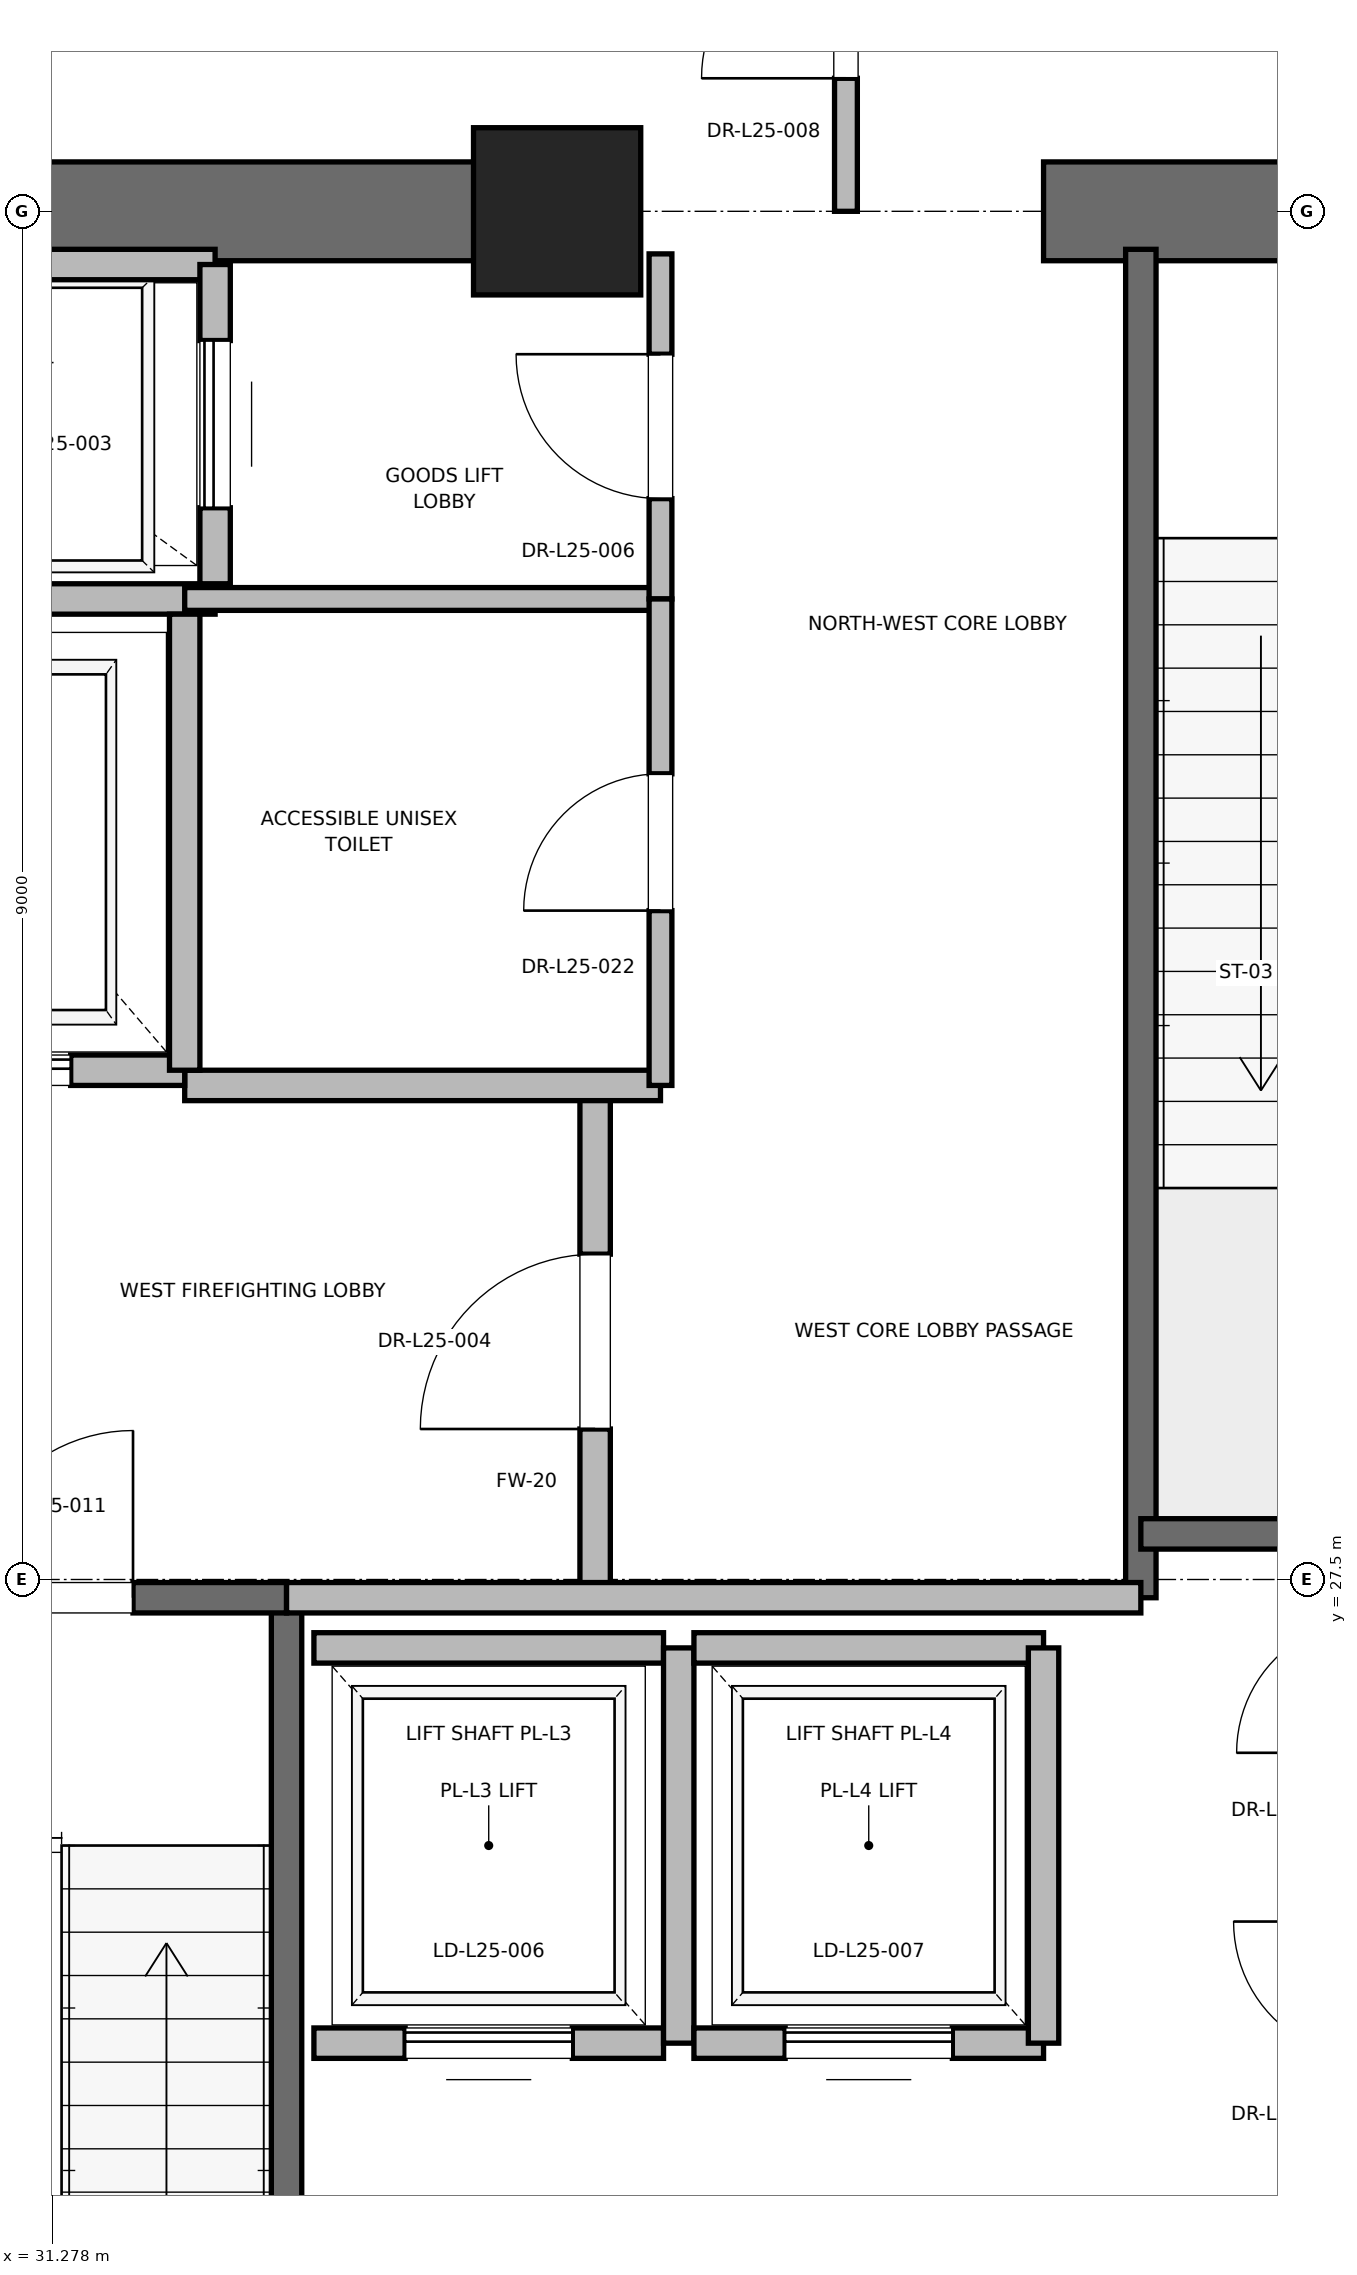
"""IFC4 building model, lengths in metres.
Left out: names, types, materials, properties, quantities, classifications, styles, units other than length and angle.
Written with IfcOpenShell. Run it as: python <this file> out.ifc"""

import sys

from ifc_helpers import new_model, si_unit, direction, frame, frame_2d, origin, origin_2d, place, context, subcontext, project, spatial, rectangle, extrude, element, fill, save


model = new_model("IFC4")
c1 = context("Model", 3, precision=1e-05, world=origin(), true_north=direction((0.0, 1.0)))
c2 = subcontext(c1, "Body", "Model", "MODEL_VIEW")
j1 = project(units=[si_unit("LENGTHUNIT", "METRE"), si_unit("PLANEANGLEUNIT", "RADIAN")], contexts=[c1])
p1 = place(None, origin())
s1 = spatial("IfcSite", under=j1, at=p1, CompositionType="ELEMENT")
p2 = place(p1, origin())
s2 = spatial("IfcBuilding", under=s1, at=p2, CompositionType="ELEMENT")
p3 = place(p2, frame((0.0, 0.0, 107.6)))
s3 = spatial("IfcBuildingStorey", under=s2, at=p3, CompositionType="ELEMENT", Elevation=107.6)
p4 = place(p3, frame((34.6, 36.5, 0.0), z_axis=(0.0, 0.0, 1.0), x_axis=(1.0, 0.0, 0.0)))
e1 = element("IfcColumn", 1, at=p4, inside=s3, PredefinedType="PILASTER", context=c2, shape_type="SweptSolid", body=[
    extrude(rectangle(XDim=1.1, YDim=1.1, at=origin_2d()), origin(), (0.0, 0.0, 1.0), 5.4),
])
p5 = place(p3, frame((29.0, 36.5, 0.0), z_axis=(0.0, 0.0, 1.0), x_axis=(1.0, 0.0, 0.0)))
e2 = element("IfcWall", 2, at=p5, inside=s3, PredefinedType="SHEAR", context=c2, shape_type="SweptSolid", body=[
    extrude(rectangle(XDim=5.8, YDim=0.65, at=frame_2d((2.9, 0.0))), origin(), (0.0, 0.0, 1.0), 5.1),
])
p6 = place(p3, frame((37.8, 36.5, 0.0), z_axis=(0.0, 0.0, 1.0), x_axis=(1.0, 0.0, 0.0)))
e3 = element("IfcWall", 3, at=p6, inside=s3, PredefinedType="SHEAR", context=c2, shape_type="SweptSolid", body=[
    extrude(rectangle(XDim=4.4, YDim=0.65, at=frame_2d((2.2, 0.0))), origin(), (0.0, 0.0, 1.0), 5.1),
])
p7 = place(p6, frame((1.65, 0.0, 0.0)))
e4 = element("IfcOpeningElement", 4, at=p7, cuts=e3, PredefinedType="OPENING", context=c2, shape_type="SweptSolid", body=[
    extrude(rectangle(XDim=1.1, YDim=2.15, at=frame_2d((0.55, 1.075))), frame((0.0, 0.325, 0.0), z_axis=(0.0, -1.0, 0.0), x_axis=(1.0, 0.0, 0.0)), (0.0, 0.0, 1.0), 0.65),
])
p8 = place(p3, frame((32.82, 18.6, 0.0), z_axis=(0.0, 0.0, 1.0), x_axis=(0.0, 1.0, 0.0)))
e5 = element("IfcWall", 5, at=p8, inside=s3, PredefinedType="SOLIDWALL", context=c2, shape_type="SweptSolid", body=[
    extrude(rectangle(XDim=8.78, YDim=0.2, at=frame_2d((4.39, 0.0))), origin(), (0.0, 0.0, 1.0), 5.1),
])
p9 = place(p3, frame((29.7, 27.38, 0.0), z_axis=(0.0, 0.0, 1.0), x_axis=(1.0, 0.0, 0.0)))
e6 = element("IfcWall", 6, at=p9, inside=s3, PredefinedType="SOLIDWALL", context=c2, shape_type="SweptSolid", body=[
    extrude(rectangle(XDim=3.12, YDim=0.2, at=frame_2d((1.56, 0.0))), origin(), (0.0, 0.0, 1.0), 5.1),
])
p10 = place(p9, frame((1.01, 0.0, 0.0)))
e7 = element("IfcOpeningElement", 7, at=p10, cuts=e6, PredefinedType="OPENING", context=c2, shape_type="SweptSolid", body=[
    extrude(rectangle(XDim=1.1, YDim=2.15, at=frame_2d((0.55, 1.075))), frame((0.0, 0.1, 0.0), z_axis=(0.0, -1.0, 0.0), x_axis=(1.0, 0.0, 0.0)), (0.0, 0.0, 1.0), 0.2),
])
p11 = place(p3, frame((38.44, 27.38, 0.0), z_axis=(0.0, 0.0, 1.0), x_axis=(0.0, 1.0, 0.0)))
e8 = element("IfcWall", 8, at=p11, inside=s3, PredefinedType="SOLIDWALL", context=c2, shape_type="SweptSolid", body=[
    extrude(rectangle(XDim=8.87, YDim=0.2, at=frame_2d((4.435, 0.0))), origin(), (0.0, 0.0, 1.0), 5.1),
])
p12 = place(p3, frame((38.44, 27.8, 0.0), z_axis=(0.0, 0.0, 1.0), x_axis=(1.0, 0.0, 0.0)))
e9 = element("IfcWall", 9, at=p12, inside=s3, PredefinedType="SOLIDWALL", context=c2, shape_type="SweptSolid", body=[
    extrude(rectangle(XDim=3.32, YDim=0.2, at=frame_2d((1.66, 0.0))), origin(), (0.0, 0.0, 1.0), 5.1),
])
p13 = place(p3, frame((34.85, 27.38, 0.0), z_axis=(0.0, 0.0, 1.0), x_axis=(0.0, 1.0, 0.0)))
e10 = element("IfcWall", 10, at=p13, inside=s3, PredefinedType="PARTITIONING", context=c2, shape_type="SweptSolid", body=[
    extrude(rectangle(XDim=3.37, YDim=0.2, at=frame_2d((1.685, 0.0))), origin(), (0.0, 0.0, 1.0), 5.1),
])
p14 = place(p13, frame((1.11, 0.0, 0.0)))
e11 = element("IfcOpeningElement", 11, at=p14, cuts=e10, PredefinedType="OPENING", context=c2, shape_type="SweptSolid", body=[
    extrude(rectangle(XDim=1.15, YDim=2.2, at=frame_2d((0.575, 1.1))), frame((0.0, 0.1, 0.0), z_axis=(0.0, -1.0, 0.0), x_axis=(1.0, 0.0, 0.0)), (0.0, 0.0, 1.0), 0.2),
])
p15 = place(p3, frame((32.82, 27.38, 0.0), z_axis=(0.0, 0.0, 1.0), x_axis=(1.0, 0.0, 0.0)))
e12 = element("IfcWall", 12, at=p15, inside=s3, PredefinedType="PARTITIONING", context=c2, shape_type="SweptSolid", body=[
    extrude(rectangle(XDim=5.62, YDim=0.2, at=frame_2d((2.81, 0.0))), origin(), (0.0, 0.0, 1.0), 5.1),
])
p16 = place(p3, frame((32.15, 30.75, 0.0), z_axis=(0.0, 0.0, 1.0), x_axis=(1.0, 0.0, 0.0)))
e13 = element("IfcWall", 13, at=p16, inside=s3, PredefinedType="PARTITIONING", context=c2, shape_type="SweptSolid", body=[
    extrude(rectangle(XDim=3.13, YDim=0.2, at=frame_2d((1.565, 0.0))), origin(), (0.0, 0.0, 1.0), 5.1),
])
p17 = place(p3, frame((29.55, 30.85, 0.0), z_axis=(0.0, 0.0, 1.0), x_axis=(1.0, 0.0, 0.0)))
e14 = element("IfcWall", 14, at=p17, inside=s3, PredefinedType="SOLIDWALL", context=c2, shape_type="SweptSolid", body=[
    extrude(rectangle(XDim=2.6, YDim=0.2, at=frame_2d((1.3, 0.0))), origin(), (0.0, 0.0, 1.0), 3.88),
])
p18 = place(p17, frame((0.75, 0.0, 0.0)))
e15 = element("IfcOpeningElement", 15, at=p18, cuts=e14, PredefinedType="OPENING", context=c2, shape_type="SweptSolid", body=[
    extrude(rectangle(XDim=1.1, YDim=2.2, at=frame_2d((0.55, 1.1))), frame((0.0, 0.1, 0.0), z_axis=(0.0, -1.0, 0.0), x_axis=(1.0, 0.0, 0.0)), (0.0, 0.0, 1.0), 0.2),
])
p19 = place(p3, frame((29.55, 33.95, 0.0), z_axis=(0.0, 0.0, 1.0), x_axis=(1.0, 0.0, 0.0)))
e16 = element("IfcWall", 16, at=p19, inside=s3, PredefinedType="SOLIDWALL", context=c2, shape_type="SweptSolid", body=[
    extrude(rectangle(XDim=2.8, YDim=0.2, at=frame_2d((1.4, 0.0))), origin(), (0.0, 0.0, 1.0), 5.1),
])
p20 = place(p3, frame((32.15, 30.85, 0.0), z_axis=(0.0, 0.0, 1.0), x_axis=(0.0, 1.0, 0.0)))
e17 = element("IfcWall", 17, at=p20, inside=s3, PredefinedType="SOLIDWALL", context=c2, shape_type="SweptSolid", body=[
    extrude(rectangle(XDim=3.0, YDim=0.2, at=frame_2d((1.5, 0.0))), origin(), (0.0, 0.0, 1.0), 5.1),
])
p21 = place(p3, frame((32.35, 36.15, 0.0), z_axis=(0.0, 0.0, 1.0), x_axis=(-1.0, 0.0, 0.0)))
e18 = element("IfcWall", 18, at=p21, inside=s3, PredefinedType="SOLIDWALL", context=c2, shape_type="SweptSolid", body=[
    extrude(rectangle(XDim=2.8, YDim=0.2, at=frame_2d((1.4, 0.0))), origin(), (0.0, 0.0, 1.0), 4.153),
])
p22 = place(p3, frame((32.35, 34.05, 0.0), z_axis=(0.0, 0.0, 1.0), x_axis=(0.0, 1.0, 0.0)))
e19 = element("IfcWall", 19, at=p22, inside=s3, PredefinedType="SOLIDWALL", context=c2, shape_type="SweptSolid", body=[
    extrude(rectangle(XDim=2.1, YDim=0.2, at=frame_2d((1.05, 0.0))), origin(), (0.0, 0.0, 1.0), 5.1),
])
p23 = place(p22, frame((0.5, 0.0, 0.0)))
e20 = element("IfcOpeningElement", 20, at=p23, cuts=e19, PredefinedType="OPENING", context=c2, shape_type="SweptSolid", body=[
    extrude(rectangle(XDim=1.1, YDim=2.2, at=frame_2d((0.55, 1.1))), frame((0.0, 0.1, 0.0), z_axis=(0.0, -1.0, 0.0), x_axis=(1.0, 0.0, 0.0)), (0.0, 0.0, 1.0), 0.2),
])
p24 = place(p3, frame((33.0, 24.45, 0.0), z_axis=(0.0, 0.0, 1.0), x_axis=(1.0, 0.0, 0.0)))
e21 = element("IfcWall", 21, at=p24, inside=s3, PredefinedType="SOLIDWALL", context=c2, shape_type="SweptSolid", body=[
    extrude(rectangle(XDim=2.3, YDim=0.2, at=frame_2d((1.15, 0.0))), origin(), (0.0, 0.0, 1.0), 5.1),
])
p25 = place(p24, frame((0.6, 0.0, 0.0)))
e22 = element("IfcOpeningElement", 22, at=p25, cuts=e21, PredefinedType="OPENING", context=c2, shape_type="SweptSolid", body=[
    extrude(rectangle(XDim=1.1, YDim=2.2, at=frame_2d((0.55, 1.1))), frame((0.0, 0.1, 0.0), z_axis=(0.0, -1.0, 0.0), x_axis=(1.0, 0.0, 0.0)), (0.0, 0.0, 1.0), 0.2),
])
p26 = place(p3, frame((35.3, 27.05, 0.0), z_axis=(0.0, 0.0, 1.0), x_axis=(-1.0, 0.0, 0.0)))
e23 = element("IfcWall", 23, at=p26, inside=s3, PredefinedType="SOLIDWALL", context=c2, shape_type="SweptSolid", body=[
    extrude(rectangle(XDim=2.3, YDim=0.2, at=frame_2d((1.15, 0.0))), origin(), (0.0, 0.0, 1.0), 5.1),
])
p27 = place(p3, frame((35.4, 24.45, 0.0), z_axis=(0.0, 0.0, 1.0), x_axis=(0.0, 1.0, 0.0)))
e24 = element("IfcWall", 24, at=p27, inside=s3, PredefinedType="SOLIDWALL", context=c2, shape_type="SweptSolid", body=[
    extrude(rectangle(XDim=2.6, YDim=0.2, at=frame_2d((1.3, 0.0))), origin(), (0.0, 0.0, 1.0), 5.1),
])
p28 = place(p3, frame((35.5, 24.45, 0.0), z_axis=(0.0, 0.0, 1.0), x_axis=(1.0, 0.0, 0.0)))
e25 = element("IfcWall", 25, at=p28, inside=s3, PredefinedType="SOLIDWALL", context=c2, shape_type="SweptSolid", body=[
    extrude(rectangle(XDim=2.3, YDim=0.2, at=frame_2d((1.15, 0.0))), origin(), (0.0, 0.0, 1.0), 5.1),
])
p29 = place(p28, frame((0.6, 0.0, 0.0)))
e26 = element("IfcOpeningElement", 26, at=p29, cuts=e25, PredefinedType="OPENING", context=c2, shape_type="SweptSolid", body=[
    extrude(rectangle(XDim=1.1, YDim=2.2, at=frame_2d((0.55, 1.1))), frame((0.0, 0.1, 0.0), z_axis=(0.0, -1.0, 0.0), x_axis=(1.0, 0.0, 0.0)), (0.0, 0.0, 1.0), 0.2),
])
p30 = place(p3, frame((37.8, 27.05, 0.0), z_axis=(0.0, 0.0, 1.0), x_axis=(-1.0, 0.0, 0.0)))
e27 = element("IfcWall", 27, at=p30, inside=s3, PredefinedType="SOLIDWALL", context=c2, shape_type="SweptSolid", body=[
    extrude(rectangle(XDim=2.3, YDim=0.2, at=frame_2d((1.15, 0.0))), origin(), (0.0, 0.0, 1.0), 5.1),
])
p31 = place(p3, frame((37.8, 24.45, 0.0), z_axis=(0.0, 0.0, 1.0), x_axis=(0.0, 1.0, 0.0)))
e28 = element("IfcWall", 28, at=p31, inside=s3, PredefinedType="SOLIDWALL", context=c2, shape_type="SweptSolid", body=[
    extrude(rectangle(XDim=2.6, YDim=0.2, at=frame_2d((1.3, 0.0))), origin(), (0.0, 0.0, 1.0), 5.1),
])
p32 = place(p3, frame((32.15, 33.95, 0.0), z_axis=(0.0, 0.0, 1.0), x_axis=(1.0, 0.0, 0.0)))
e29 = element("IfcWall", 29, at=p32, inside=s3, PredefinedType="PARTITIONING", context=c2, shape_type="SweptSolid", body=[
    extrude(rectangle(XDim=3.13, YDim=0.15, at=frame_2d((1.565, 0.0))), origin(), (0.0, 0.0, 1.0), 2.85),
])
p33 = place(p3, frame((35.28, 33.95, 0.0), z_axis=(0.0, 0.0, 1.0), x_axis=(0.0, 1.0, 0.0)))
e30 = element("IfcWall", 30, at=p33, inside=s3, PredefinedType="PARTITIONING", context=c2, shape_type="SweptSolid", body=[
    extrude(rectangle(XDim=2.27, YDim=0.15, at=frame_2d((1.135, 0.0))), origin(), (0.0, 0.0, 1.0), 2.85),
])
p34 = place(p33, frame((0.66, 0.0, 0.0)))
e31 = element("IfcOpeningElement", 31, at=p34, cuts=e30, PredefinedType="OPENING", context=c2, shape_type="SweptSolid", body=[
    extrude(rectangle(XDim=0.95, YDim=2.15, at=frame_2d((0.475, 1.075))), frame((0.0, 0.075, 0.0), z_axis=(0.0, -1.0, 0.0), x_axis=(1.0, 0.0, 0.0)), (0.0, 0.0, 1.0), 0.15),
])
p35 = place(p3, frame((35.28, 30.75, 0.0), z_axis=(0.0, 0.0, 1.0), x_axis=(0.0, 1.0, 0.0)))
e32 = element("IfcWall", 32, at=p35, inside=s3, PredefinedType="PARTITIONING", context=c2, shape_type="SweptSolid", body=[
    extrude(rectangle(XDim=3.2, YDim=0.15, at=frame_2d((1.6, 0.0))), origin(), (0.0, 0.0, 1.0), 2.85),
])
p36 = place(p35, frame((1.15, 0.0, 0.0)))
e33 = element("IfcOpeningElement", 33, at=p36, cuts=e32, PredefinedType="OPENING", context=c2, shape_type="SweptSolid", body=[
    extrude(rectangle(XDim=0.9, YDim=2.1, at=frame_2d((0.45, 1.05))), frame((0.0, 0.075, 0.0), z_axis=(0.0, -1.0, 0.0), x_axis=(1.0, 0.0, 0.0)), (0.0, 0.0, 1.0), 0.15),
])
p37 = place(p3, frame((36.5, 36.5, 0.0), z_axis=(0.0, 0.0, 1.0), x_axis=(0.0, 1.0, 0.0)))
e34 = element("IfcWall", 34, at=p37, inside=s3, PredefinedType="PARTITIONING", context=c2, shape_type="SweptSolid", body=[
    extrude(rectangle(XDim=2.7, YDim=0.15, at=frame_2d((1.35, 0.0))), origin(), (0.0, 0.0, 1.0), 2.85),
])
p38 = place(p37, frame((0.875, 0.0, 0.0)))
e35 = element("IfcOpeningElement", 35, at=p38, cuts=e34, PredefinedType="OPENING", context=c2, shape_type="SweptSolid", body=[
    extrude(rectangle(XDim=0.95, YDim=2.15, at=frame_2d((0.475, 1.075))), frame((0.0, 0.075, 0.0), z_axis=(0.0, -1.0, 0.0), x_axis=(1.0, 0.0, 0.0)), (0.0, 0.0, 1.0), 0.15),
])
p39 = place(p10, origin())
e36 = element("IfcDoor", 36, at=p39, inside=s3, OperationType="SINGLE_SWING_RIGHT", PredefinedType="DOOR", context=c2, shape_type="SweptSolid", body=[
    extrude(rectangle(XDim=1.1, YDim=2.15, at=frame_2d((0.55, 1.075))), frame((0.0, 0.025, 0.0), z_axis=(0.0, -1.0, 0.0), x_axis=(1.0, 0.0, 0.0)), (0.0, 0.0, 1.0), 0.05),
])
fill(e7, e36)
p40 = place(p14, origin())
e37 = element("IfcDoor", 37, at=p40, inside=s3, OperationType="SINGLE_SWING_LEFT", PredefinedType="DOOR", context=c2, shape_type="SweptSolid", body=[
    extrude(rectangle(XDim=1.15, YDim=2.2, at=frame_2d((0.575, 1.1))), frame((0.0, 0.025, 0.0), z_axis=(0.0, -1.0, 0.0), x_axis=(1.0, 0.0, 0.0)), (0.0, 0.0, 1.0), 0.05),
])
fill(e11, e37)
p41 = place(p18, origin())
e38 = element("IfcDoor", 38, at=p41, inside=s3, OperationType="SLIDING_TO_RIGHT", PredefinedType="DOOR", context=c2, shape_type="SweptSolid", body=[
    extrude(rectangle(XDim=1.1, YDim=2.2, at=frame_2d((0.55, 1.1))), frame((0.0, 0.025, 0.0), z_axis=(0.0, -1.0, 0.0), x_axis=(1.0, 0.0, 0.0)), (0.0, 0.0, 1.0), 0.05),
])
fill(e15, e38)
p42 = place(p23, origin())
e39 = element("IfcDoor", 39, at=p42, inside=s3, OperationType="SLIDING_TO_RIGHT", PredefinedType="DOOR", context=c2, shape_type="SweptSolid", body=[
    extrude(rectangle(XDim=1.1, YDim=2.2, at=frame_2d((0.55, 1.1))), frame((0.0, 0.025, 0.0), z_axis=(0.0, -1.0, 0.0), x_axis=(1.0, 0.0, 0.0)), (0.0, 0.0, 1.0), 0.05),
])
fill(e20, e39)
p43 = place(p25, origin())
e40 = element("IfcDoor", 40, at=p43, inside=s3, OperationType="SLIDING_TO_RIGHT", PredefinedType="DOOR", context=c2, shape_type="SweptSolid", body=[
    extrude(rectangle(XDim=1.1, YDim=2.2, at=frame_2d((0.55, 1.1))), frame((0.0, 0.025, 0.0), z_axis=(0.0, -1.0, 0.0), x_axis=(1.0, 0.0, 0.0)), (0.0, 0.0, 1.0), 0.05),
])
fill(e22, e40)
p44 = place(p29, origin())
e41 = element("IfcDoor", 41, at=p44, inside=s3, OperationType="SLIDING_TO_RIGHT", PredefinedType="DOOR", context=c2, shape_type="SweptSolid", body=[
    extrude(rectangle(XDim=1.1, YDim=2.2, at=frame_2d((0.55, 1.1))), frame((0.0, 0.025, 0.0), z_axis=(0.0, -1.0, 0.0), x_axis=(1.0, 0.0, 0.0)), (0.0, 0.0, 1.0), 0.05),
])
fill(e26, e41)
p45 = place(p34, origin())
e42 = element("IfcDoor", 42, at=p45, inside=s3, OperationType="SINGLE_SWING_RIGHT", PredefinedType="DOOR", context=c2, shape_type="SweptSolid", body=[
    extrude(rectangle(XDim=0.95, YDim=2.15, at=frame_2d((0.475, 1.075))), frame((0.0, 0.025, 0.0), z_axis=(0.0, -1.0, 0.0), x_axis=(1.0, 0.0, 0.0)), (0.0, 0.0, 1.0), 0.05),
])
fill(e31, e42)
p46 = place(p36, origin())
e43 = element("IfcDoor", 43, at=p46, inside=s3, OperationType="SINGLE_SWING_LEFT", PredefinedType="DOOR", context=c2, shape_type="SweptSolid", body=[
    extrude(rectangle(XDim=0.9, YDim=2.1, at=frame_2d((0.45, 1.05))), frame((0.0, 0.025, 0.0), z_axis=(0.0, -1.0, 0.0), x_axis=(1.0, 0.0, 0.0)), (0.0, 0.0, 1.0), 0.05),
])
fill(e33, e43)
p47 = place(p38, origin())
e44 = element("IfcDoor", 44, at=p47, inside=s3, OperationType="SINGLE_SWING_LEFT", PredefinedType="DOOR", context=c2, shape_type="SweptSolid", body=[
    extrude(rectangle(XDim=0.95, YDim=2.15, at=frame_2d((0.475, 1.075))), frame((0.0, 0.025, 0.0), z_axis=(0.0, -1.0, 0.0), x_axis=(1.0, 0.0, 0.0)), (0.0, 0.0, 1.0), 0.05),
])
fill(e35, e44)
save(model, sys.argv[1])
